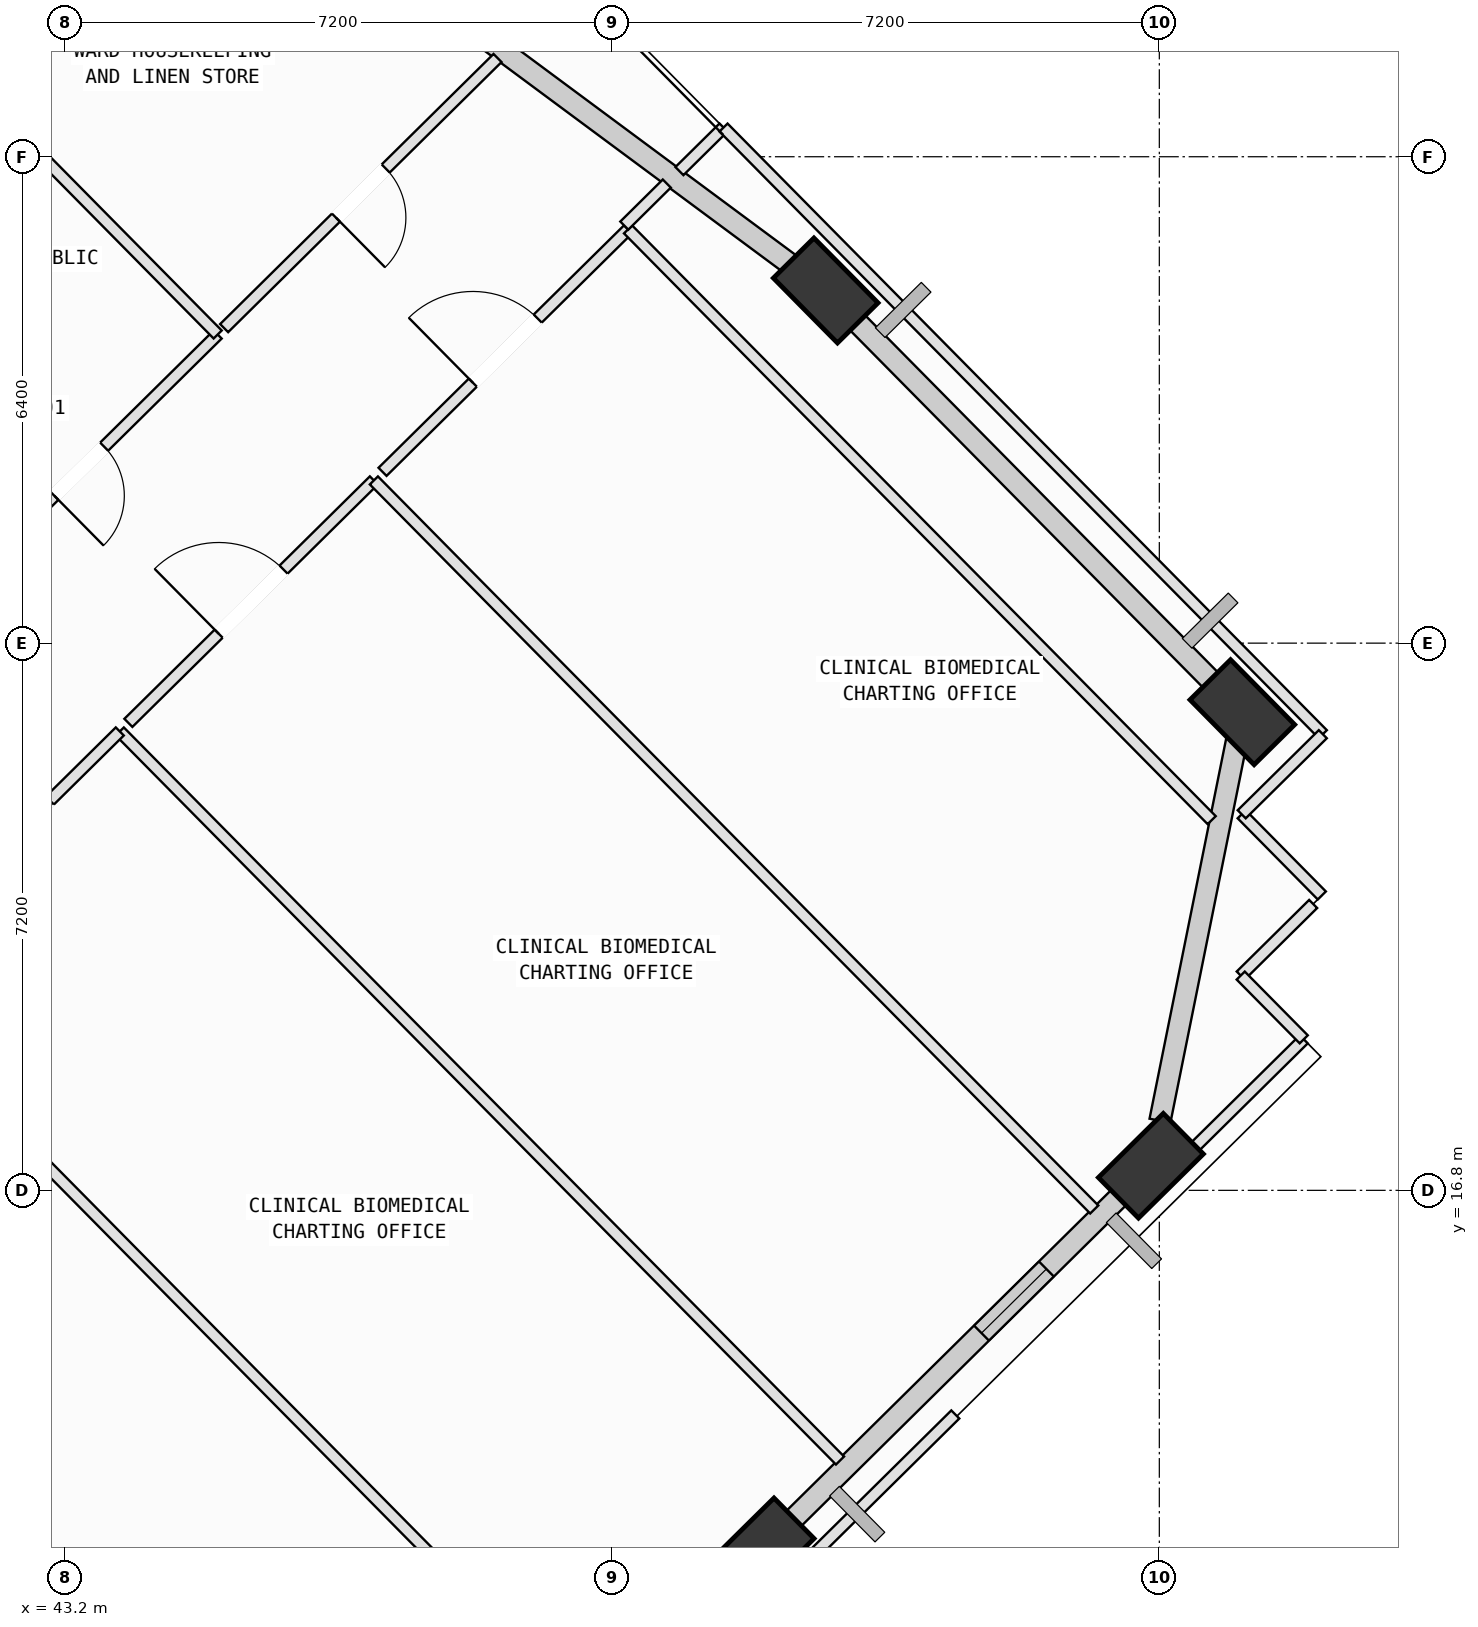
"""IFC4 building model, lengths in metres.
Left out: names, types, materials, properties, quantities, classifications, styles, units other than length and angle.
Written with IfcOpenShell. Run it as: python <this file> out.ifc"""

import sys

from ifc_helpers import new_model, si_unit, direction, frame, frame_2d, origin, origin_2d, place, context, subcontext, project, spatial, rectangle, extrude, element, fill, save


model = new_model("IFC4")
c1 = context("Model", 3, precision=1e-05, world=origin(), true_north=direction((0.0, 1.0)))
c2 = subcontext(c1, "Body", "Model", "MODEL_VIEW")
j1 = project(units=[si_unit("LENGTHUNIT", "METRE"), si_unit("PLANEANGLEUNIT", "RADIAN")], contexts=[c1])
p1 = place(None, origin())
s1 = spatial("IfcSite", under=j1, at=p1, CompositionType="ELEMENT")
p2 = place(p1, origin())
s2 = spatial("IfcBuilding", under=s1, at=p2, CompositionType="ELEMENT")
p3 = place(p2, frame((0.0, 0.0, 215.2)))
s3 = spatial("IfcBuildingStorey", under=s2, at=p3, CompositionType="ELEMENT", Elevation=215.2)
p4 = place(p3, frame((52.367, 12.063, 0.002), z_axis=(0.051942793998, 0.077853368054, 0.995610766934), x_axis=(-0.980116876349, -0.187202601198, 0.065773055283)))
e1 = element("IfcColumn", 1, at=p4, inside=s3, PredefinedType="COLUMN", context=c2, shape_type="SweptSolid", body=[
    extrude(rectangle(XDim=1.2, YDim=0.75, at=origin_2d()), origin(), (0.0, 0.0, 1.0), 4.014),
])
p5 = place(p3, frame((57.489, 17.124, 0.002), z_axis=(0.030807048022, 0.098740538532, 0.994636230912), x_axis=(-0.887317717969, -0.455393496583, 0.072691338198)))
e2 = element("IfcColumn", 2, at=p5, inside=s3, PredefinedType="COLUMN", context=c2, shape_type="SweptSolid", body=[
    extrude(rectangle(XDim=1.2, YDim=0.75, at=origin_2d()), origin(), (0.0, 0.0, 1.0), 4.018),
])
p6 = place(p3, frame((58.692, 23.091, 0.002), z_axis=(0.006197719609, 0.103477612679, 0.994612473251), x_axis=(0.659212769756, -0.74833138919, 0.073747244992)))
e3 = element("IfcColumn", 3, at=p6, inside=s3, PredefinedType="COLUMN", context=c2, shape_type="SweptSolid", body=[
    extrude(rectangle(XDim=1.2, YDim=0.75, at=origin_2d()), origin(), (0.0, 0.0, 1.0), 4.018),
])
p7 = place(p3, frame((53.211, 28.64, 0.002), z_axis=(-0.016560006335, 0.080912678011, 0.996583616526), x_axis=(0.830659383992, -0.553672081187, 0.05875554697)))
e4 = element("IfcColumn", 4, at=p7, inside=s3, PredefinedType="COLUMN", context=c2, shape_type="SweptSolid", body=[
    extrude(rectangle(XDim=1.2, YDim=0.75, at=origin_2d()), origin(), (0.0, 0.0, 1.0), 4.01),
])
p8 = place(p3, frame((57.346, 16.981, 0.0), z_axis=(0.0, 0.0, 1.0), x_axis=(-0.711410830426, -0.702776372932, 0.0)))
e5 = element("IfcWall", 5, at=p8, inside=s3, PredefinedType="SOLIDWALL", context=c2, shape_type="SweptSolid", body=[
    extrude(rectangle(XDim=6.418, YDim=0.28, at=frame_2d((3.209, 0.0))), origin(), (0.0, 0.0, 1.0), 3.265),
])
p9 = place(p8, frame((1.731, 0.0, 0.75)))
e6 = element("IfcOpeningElement", 6, at=p9, cuts=e5, PredefinedType="OPENING", context=c2, shape_type="SweptSolid", body=[
    extrude(rectangle(XDim=1.2, YDim=1.75, at=frame_2d((0.6, 0.875))), frame((0.0, 0.15, 0.0), z_axis=(0.0, -1.0, 0.0), x_axis=(1.0, 0.0, 0.0)), (0.0, 0.0, 1.0), 0.3),
])
p10 = place(p3, frame((58.655, 22.905, 0.0), z_axis=(0.0, 0.0, 1.0), x_axis=(-0.197650115181, -0.98027263145, 0.0)))
e7 = element("IfcWall", 7, at=p10, inside=s3, PredefinedType="SOLIDWALL", context=c2, shape_type="SweptSolid", body=[
    extrude(rectangle(XDim=5.294, YDim=0.28, at=frame_2d((2.647, 0.0))), origin(), (0.0, 0.0, 1.0), 3.265),
])
p11 = place(p3, frame((53.385, 28.463, 0.0), z_axis=(0.0, 0.0, 1.0), x_axis=(0.702779857977, -0.711407387663, 0.0)))
e8 = element("IfcWall", 8, at=p11, inside=s3, PredefinedType="SOLIDWALL", context=c2, shape_type="SweptSolid", body=[
    extrude(rectangle(XDim=7.046, YDim=0.28, at=frame_2d((3.523, 0.0))), origin(), (0.0, 0.0, 1.0), 3.265),
])
p12 = place(p3, frame((45.547, 34.323, 0.0), z_axis=(0.0, 0.0, 1.0), x_axis=(0.803236884765, -0.595659724131, 0.0)))
e9 = element("IfcWall", 9, at=p12, inside=s3, PredefinedType="SOLIDWALL", context=c2, shape_type="SweptSolid", body=[
    extrude(rectangle(XDim=9.036, YDim=0.28, at=frame_2d((4.518, 0.0))), origin(), (0.0, 0.0, 1.0), 3.265),
])
p13 = place(p3, frame((40.242, 29.464, 0.0), z_axis=(0.0, 0.0, 1.0), x_axis=(0.711432569106, 0.702754366486, 0.0)))
e10 = element("IfcWall", 10, at=p13, inside=s3, PredefinedType="SOLIDWALL", context=c2, shape_type="SweptSolid", body=[
    extrude(rectangle(XDim=6.78, YDim=0.28, at=frame_2d((3.39, 0.0))), origin(), (0.0, 0.0, 1.0), 3.165),
])
p14 = place(p13, frame((4.024, 0.0, 0.75)))
e11 = element("IfcOpeningElement", 11, at=p14, cuts=e10, PredefinedType="OPENING", context=c2, shape_type="SweptSolid", body=[
    extrude(rectangle(XDim=1.6, YDim=1.95, at=frame_2d((0.8, 0.975))), frame((0.0, 0.15, 0.0), z_axis=(0.0, -1.0, 0.0), x_axis=(1.0, 0.0, 0.0)), (0.0, 0.0, 1.0), 0.3),
])
p15 = place(p3, frame((37.235, 16.232, 0.0), z_axis=(0.0, 0.0, 1.0), x_axis=(0.702784644296, -0.711402659358, 0.0)))
e12 = element("IfcWall", 12, at=p15, inside=s3, PredefinedType="PARTITIONING", context=c2, shape_type="SweptSolid", body=[
    extrude(rectangle(XDim=13.485, YDim=0.15, at=frame_2d((6.742, 0.0))), origin(), (0.0, 0.0, 1.0), 3.78),
])
p16 = place(p15, frame((6.312, 0.0, 0.0)))
e13 = element("IfcOpeningElement", 13, at=p16, cuts=e12, PredefinedType="OPENING", context=c2, shape_type="SweptSolid", body=[
    extrude(rectangle(XDim=0.86, YDim=2.06, at=frame_2d((0.43, 1.03))), frame((0.0, 0.085, 0.0), z_axis=(0.0, -1.0, 0.0), x_axis=(1.0, 0.0, 0.0)), (0.0, 0.0, 1.0), 0.17),
])
p17 = place(p3, frame((41.23, 18.876, 0.0), z_axis=(0.0, 0.0, 1.0), x_axis=(0.702748277784, -0.711438583485, 0.0)))
e14 = element("IfcWall", 14, at=p17, inside=s3, PredefinedType="PARTITIONING", context=c2, shape_type="SweptSolid", body=[
    extrude(rectangle(XDim=12.558, YDim=0.15, at=frame_2d((6.279, 0.0))), origin(), (0.0, 0.0, 1.0), 3.78),
])
p18 = place(p3, frame((43.923, 22.838, 0.0), z_axis=(0.0, 0.0, 1.0), x_axis=(0.702757042413, -0.711429925811, 0.0)))
e15 = element("IfcWall", 15, at=p18, inside=s3, PredefinedType="PARTITIONING", context=c2, shape_type="SweptSolid", body=[
    extrude(rectangle(XDim=13.484, YDim=0.15, at=frame_2d((6.742, 0.0))), origin(), (0.0, 0.0, 1.0), 3.415),
])
p19 = place(p3, frame((41.23, 20.178, 0.0), z_axis=(0.0, 0.0, 1.0), x_axis=(0.711479053184, 0.70270730527, 0.0)))
e16 = element("IfcWall", 16, at=p19, inside=s3, PredefinedType="PARTITIONING", context=c2, shape_type="SweptSolid", body=[
    extrude(rectangle(XDim=3.785, YDim=0.15, at=frame_2d((1.893, 0.0))), origin(), (0.0, 0.0, 1.0), 3.78),
])
p20 = place(p19, frame((1.292, 0.0, 0.0)))
e17 = element("IfcOpeningElement", 17, at=p20, cuts=e16, PredefinedType="OPENING", context=c2, shape_type="SweptSolid", body=[
    extrude(rectangle(XDim=1.2, YDim=2.15, at=frame_2d((0.6, 1.075))), frame((0.0, 0.085, 0.0), z_axis=(0.0, -1.0, 0.0), x_axis=(1.0, 0.0, 0.0)), (0.0, 0.0, 1.0), 0.17),
])
p21 = place(p3, frame((44.036, 22.951, 0.0), z_axis=(0.0, 0.0, 1.0), x_axis=(0.711502616413, 0.702683447107, 0.0)))
e18 = element("IfcWall", 18, at=p21, inside=s3, PredefinedType="PARTITIONING", context=c2, shape_type="SweptSolid", body=[
    extrude(rectangle(XDim=4.54, YDim=0.15, at=frame_2d((2.27, 0.0))), origin(), (0.0, 0.0, 1.0), 3.78),
])
p22 = place(p21, frame((1.67, 0.0, 0.0)))
e19 = element("IfcOpeningElement", 19, at=p22, cuts=e18, PredefinedType="OPENING", context=c2, shape_type="SweptSolid", body=[
    extrude(rectangle(XDim=1.2, YDim=2.15, at=frame_2d((0.6, 1.075))), frame((0.0, 0.085, 0.0), z_axis=(0.0, -1.0, 0.0), x_axis=(1.0, 0.0, 0.0)), (0.0, 0.0, 1.0), 0.17),
])
p23 = place(p3, frame((47.266, 26.141, 0.0), z_axis=(0.0, 0.0, 1.0), x_axis=(0.702821292956, -0.711366452799, 0.0)))
e20 = element("IfcWall", 20, at=p23, inside=s3, PredefinedType="PARTITIONING", context=c2, shape_type="SweptSolid", body=[
    extrude(rectangle(XDim=13.485, YDim=0.15, at=frame_2d((6.743, 0.0))), origin(), (0.0, 0.0, 1.0), 3.78),
])
p24 = place(p3, frame((59.5, 18.787, 0.0), z_axis=(0.0, 0.0, 1.0), x_axis=(-0.711363988973, -0.702823786729, 0.0)))
e21 = element("IfcWall", 21, at=p24, inside=s3, PredefinedType="PARTITIONING", context=c2, shape_type="SweptSolid", body=[
    extrude(rectangle(XDim=2.802, YDim=0.15, at=frame_2d((1.401, 0.0))), origin(), (0.0, 0.0, 1.0), 3.265),
])
p25 = place(p3, frame((47.38, 26.254, 0.0), z_axis=(0.0, 0.0, 1.0), x_axis=(0.711502616413, 0.702683447107, 0.0)))
e22 = element("IfcWall", 22, at=p25, inside=s3, PredefinedType="PARTITIONING", context=c2, shape_type="SweptSolid", body=[
    extrude(rectangle(XDim=4.54, YDim=0.15, at=frame_2d((2.27, 0.0))), origin(), (0.0, 0.0, 1.0), 3.78),
])
p26 = place(p25, frame((1.67, 0.0, 0.0)))
e23 = element("IfcOpeningElement", 23, at=p26, cuts=e22, PredefinedType="OPENING", context=c2, shape_type="SweptSolid", body=[
    extrude(rectangle(XDim=1.2, YDim=2.15, at=frame_2d((0.6, 1.075))), frame((0.0, 0.085, 0.0), z_axis=(0.0, -1.0, 0.0), x_axis=(1.0, 0.0, 0.0)), (0.0, 0.0, 1.0), 0.17),
])
p27 = place(p3, frame((50.61, 29.444, 0.0), z_axis=(0.0, 0.0, 1.0), x_axis=(0.702781267374, -0.711405995356, 0.0)))
e24 = element("IfcWall", 24, at=p27, inside=s3, PredefinedType="PARTITIONING", context=c2, shape_type="SweptSolid", body=[
    extrude(rectangle(XDim=10.927, YDim=0.15, at=frame_2d((5.463, 0.0))), origin(), (0.0, 0.0, 1.0), 3.78),
])
p28 = place(p3, frame((59.624, 20.568, 0.0), z_axis=(0.0, 0.0, 1.0), x_axis=(-0.711193738227, -0.702996064503, 0.0)))
e25 = element("IfcWall", 25, at=p28, inside=s3, PredefinedType="PARTITIONING", context=c2, shape_type="SweptSolid", body=[
    extrude(rectangle(XDim=1.34, YDim=0.15, at=frame_2d((0.67, 0.0))), origin(), (0.0, 0.0, 1.0), 3.78),
])
p29 = place(p3, frame((58.671, 19.626, 0.0), z_axis=(0.0, 0.0, 1.0), x_axis=(0.702954763659, -0.71123456064, 0.0)))
e26 = element("IfcWall", 26, at=p29, inside=s3, PredefinedType="PARTITIONING", context=c2, shape_type="SweptSolid", body=[
    extrude(rectangle(XDim=1.179, YDim=0.15, at=frame_2d((0.59, 0.0))), origin(), (0.0, 0.0, 1.0), 3.78),
])
p30 = place(p3, frame((45.211, 28.061, 0.0), z_axis=(0.0, 0.0, 1.0), x_axis=(-0.711361976558, -0.702825823592, 0.0)))
e27 = element("IfcWall", 27, at=p30, inside=s3, PredefinedType="PARTITIONING", context=c2, shape_type="SweptSolid", body=[
    extrude(rectangle(XDim=5.12, YDim=0.15, at=frame_2d((2.56, 0.0))), origin(), (0.0, 0.0, 1.0), 3.78),
])
p31 = place(p30, frame((2.1, 0.0, 0.0)))
e28 = element("IfcOpeningElement", 28, at=p31, cuts=e27, PredefinedType="OPENING", context=c2, shape_type="SweptSolid", body=[
    extrude(rectangle(XDim=0.92, YDim=2.1, at=frame_2d((0.46, 1.05))), frame((0.0, 0.085, 0.0), z_axis=(0.0, -1.0, 0.0), x_axis=(1.0, 0.0, 0.0)), (0.0, 0.0, 1.0), 0.17),
])
p32 = place(p3, frame((42.137, 31.174, 0.0), z_axis=(0.0, 0.0, 1.0), x_axis=(0.702628367002, -0.711557009581, 0.0)))
e29 = element("IfcWall", 29, at=p32, inside=s3, PredefinedType="PARTITIONING", context=c2, shape_type="SweptSolid", body=[
    extrude(rectangle(XDim=4.375, YDim=0.15, at=frame_2d((2.188, 0.0))), origin(), (0.0, 0.0, 1.0), 3.78),
])
p33 = place(p3, frame((48.893, 31.699, 0.0), z_axis=(0.0, 0.0, 1.0), x_axis=(-0.711366706514, -0.702821036156, 0.0)))
e30 = element("IfcWall", 30, at=p33, inside=s3, PredefinedType="PARTITIONING", context=c2, shape_type="SweptSolid", body=[
    extrude(rectangle(XDim=5.057, YDim=0.15, at=frame_2d((2.528, 0.0))), origin(), (0.0, 0.0, 1.0), 3.78),
])
p34 = place(p33, frame((2.068, 0.0, 0.0)))
e31 = element("IfcOpeningElement", 31, at=p34, cuts=e30, PredefinedType="OPENING", context=c2, shape_type="SweptSolid", body=[
    extrude(rectangle(XDim=0.92, YDim=2.1, at=frame_2d((0.46, 1.05))), frame((0.0, 0.085, 0.0), z_axis=(0.0, -1.0, 0.0), x_axis=(1.0, 0.0, 0.0)), (0.0, 0.0, 1.0), 0.17),
])
p35 = place(p3, frame((41.754, 31.731, 0.0), z_axis=(0.0, 0.0, 1.0), x_axis=(0.711487722313, 0.702698527818, 0.0)))
e32 = element("IfcWall", 32, at=p35, inside=s3, PredefinedType="PARTITIONING", context=c2, shape_type="SweptSolid", body=[
    extrude(rectangle(XDim=5.028, YDim=0.15, at=frame_2d((2.514, 0.0))), origin(), (0.0, 0.0, 1.0), 3.165),
])
p36 = place(p3, frame((54.916, 13.851, 0.0), z_axis=(0.0, 0.0, 1.0), x_axis=(-0.711373509775, -0.702814150107, 0.0)))
e33 = element("IfcWall", 33, at=p36, inside=s3, PredefinedType="PARTITIONING", context=c2, shape_type="SweptSolid", body=[
    extrude(rectangle(XDim=6.189, YDim=0.15, at=frame_2d((3.095, 0.0))), origin(), (0.0, 0.0, 1.0), 3.78),
])
p37 = place(p3, frame((58.684, 21.748, 0.0), z_axis=(0.0, 0.0, 1.0), x_axis=(0.702372760381, -0.711809318199, 0.0)))
e34 = element("IfcWall", 34, at=p37, inside=s3, PredefinedType="PARTITIONING", context=c2, shape_type="SweptSolid", body=[
    extrude(rectangle(XDim=1.5, YDim=0.15, at=frame_2d((0.75, 0.0))), origin(), (0.0, 0.0, 1.0), 3.78),
])
p38 = place(p3, frame((50.561, 29.494, 0.0), z_axis=(0.0, 0.0, 1.0), x_axis=(0.710821800861, 0.703372140066, 0.0)))
e35 = element("IfcWall", 35, at=p38, inside=s3, PredefinedType="PARTITIONING", context=c2, shape_type="SweptSolid", body=[
    extrude(rectangle(XDim=0.787, YDim=0.15, at=frame_2d((0.393, 0.0))), origin(), (0.0, 0.0, 1.0), 3.78),
])
p39 = place(p3, frame((51.286, 30.211, 0.0), z_axis=(0.0, 0.0, 1.0), x_axis=(0.711435122596, 0.702751781454, 0.0)))
e36 = element("IfcWall", 36, at=p39, inside=s3, PredefinedType="PARTITIONING", context=c2, shape_type="SweptSolid", body=[
    extrude(rectangle(XDim=0.815, YDim=0.15, at=frame_2d((0.408, 0.0))), origin(), (0.0, 0.0, 1.0), 3.78),
])
p40 = place(p3, frame((51.866, 30.784, 0.0), z_axis=(0.0, 0.0, 1.0), x_axis=(0.702774280848, -0.711412897113, 0.0)))
e37 = element("IfcWall", 37, at=p40, inside=s3, PredefinedType="PARTITIONING", context=c2, shape_type="SweptSolid", body=[
    extrude(rectangle(XDim=11.22, YDim=0.15, at=frame_2d((5.61, 0.0))), origin(), (0.0, 0.0, 1.0), 3.265),
])
p41 = place(p3, frame((59.751, 22.802, 0.0), z_axis=(0.0, 0.0, 1.0), x_axis=(-0.711407649293, -0.702779593135, 0.0)))
e38 = element("IfcWall", 38, at=p41, inside=s3, PredefinedType="PARTITIONING", context=c2, shape_type="SweptSolid", body=[
    extrude(rectangle(XDim=1.5, YDim=0.15, at=frame_2d((0.75, 0.0))), origin(), (0.0, 0.0, 1.0), 3.78),
])
p42 = place(p9, origin())
e39 = element("IfcWindow", 39, at=p42, inside=s3, PartitioningType="SINGLE_PANEL", PredefinedType="WINDOW", context=c2, shape_type="SweptSolid", body=[
    extrude(rectangle(XDim=1.2, YDim=1.75, at=frame_2d((0.6, 0.875))), frame((0.0, 0.03, 0.0), z_axis=(0.0, -1.0, 0.0), x_axis=(1.0, 0.0, 0.0)), (0.0, 0.0, 1.0), 0.06),
])
fill(e6, e39)
p43 = place(p22, origin())
e40 = element("IfcDoor", 40, at=p43, inside=s3, OperationType="SINGLE_SWING_LEFT", PredefinedType="DOOR", context=c2, shape_type="SweptSolid", body=[
    extrude(rectangle(XDim=1.2, YDim=2.15, at=frame_2d((0.6, 1.075))), frame((0.0, 0.025, 0.0), z_axis=(0.0, -1.0, 0.0), x_axis=(1.0, 0.0, 0.0)), (0.0, 0.0, 1.0), 0.05),
])
fill(e19, e40)
p44 = place(p26, origin())
e41 = element("IfcDoor", 41, at=p44, inside=s3, OperationType="SINGLE_SWING_LEFT", PredefinedType="DOOR", context=c2, shape_type="SweptSolid", body=[
    extrude(rectangle(XDim=1.2, YDim=2.15, at=frame_2d((0.6, 1.075))), frame((0.0, 0.025, 0.0), z_axis=(0.0, -1.0, 0.0), x_axis=(1.0, 0.0, 0.0)), (0.0, 0.0, 1.0), 0.05),
])
fill(e23, e41)
p45 = place(p31, origin())
e42 = element("IfcDoor", 42, at=p45, inside=s3, OperationType="SINGLE_SWING_RIGHT", PredefinedType="DOOR", context=c2, shape_type="SweptSolid", body=[
    extrude(rectangle(XDim=0.92, YDim=2.1, at=frame_2d((0.46, 1.05))), frame((0.0, 0.025, 0.0), z_axis=(0.0, -1.0, 0.0), x_axis=(1.0, 0.0, 0.0)), (0.0, 0.0, 1.0), 0.05),
])
fill(e28, e42)
p46 = place(p34, origin())
e43 = element("IfcDoor", 43, at=p46, inside=s3, OperationType="SINGLE_SWING_RIGHT", PredefinedType="DOOR", context=c2, shape_type="SweptSolid", body=[
    extrude(rectangle(XDim=0.92, YDim=2.1, at=frame_2d((0.46, 1.05))), frame((0.0, 0.025, 0.0), z_axis=(0.0, -1.0, 0.0), x_axis=(1.0, 0.0, 0.0)), (0.0, 0.0, 1.0), 0.05),
])
fill(e31, e43)
save(model, sys.argv[1])
